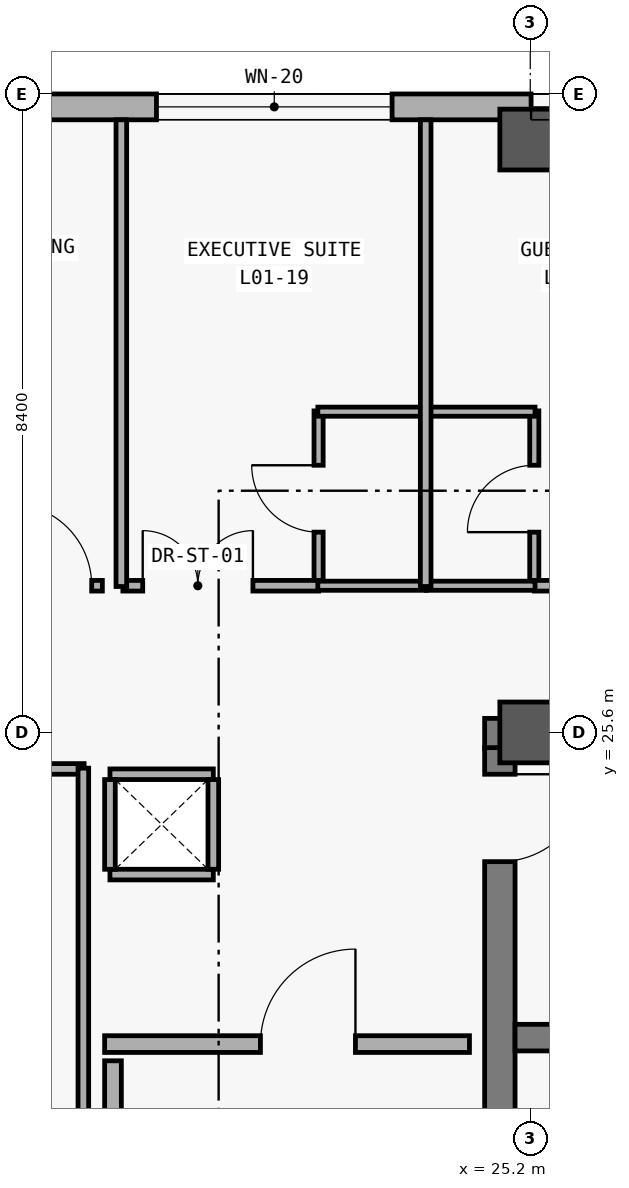
"""IFC4 building model, lengths in metres.
Left out: names, types, materials, properties, quantities, classifications, styles, units other than length and angle.
Written with IfcOpenShell. Run it as: python <this file> out.ifc"""

import sys

from ifc_helpers import new_model, si_unit, direction, frame, frame_2d, origin, origin_2d, place, context, subcontext, project, spatial, rectangle, extrude, element, fill, save


model = new_model("IFC4")
c1 = context("Model", 3, precision=1e-05, world=origin(), true_north=direction((0.0, 1.0)))
c2 = subcontext(c1, "Body", "Model", "MODEL_VIEW")
j1 = project(units=[si_unit("LENGTHUNIT", "METRE"), si_unit("PLANEANGLEUNIT", "RADIAN")], contexts=[c1])
p1 = place(None, origin())
s1 = spatial("IfcSite", under=j1, at=p1, CompositionType="ELEMENT")
p2 = place(p1, origin())
s2 = spatial("IfcBuilding", under=s1, at=p2, CompositionType="ELEMENT")
p3 = place(p2, frame((0.0, 0.0, 5.4)))
s3 = spatial("IfcBuildingStorey", under=s2, at=p3, CompositionType="ELEMENT", Elevation=5.4)
for number, where, z_axis, x_axis in (
    (1, (25.2, 25.6, 0.0), (0.0, 0.0, 1.0), (1.0, 0.0, 0.0)),
    (2, (25.2, 33.4, 0.0), (0.0, 0.0, 1.0), (1.0, 0.0, 0.0)),
):
    element("IfcColumn", number, at=place(p3, frame(where, z_axis=z_axis, x_axis=x_axis)), inside=s3, PredefinedType="COLUMN", context=c2, shape_type="SweptSolid", body=[
        extrude(rectangle(XDim=0.8, YDim=0.8, at=origin_2d()), origin(), (0.0, 0.0, 1.0), 5.4),
    ])
p4 = place(p3, frame((8.74, 33.83, 0.0), z_axis=(0.0, 0.0, 1.0), x_axis=(1.0, 0.0, 0.0)))
e3 = element("IfcWall", 3, at=p4, inside=s3, PredefinedType="SOLIDWALL", context=c2, shape_type="SweptSolid", body=[
    extrude(rectangle(XDim=83.32, YDim=0.34, at=frame_2d((41.66, 0.0))), origin(), (0.0, 0.0, 1.0), 5.1),
])
p5 = place(p4, frame((4.795, 0.0, 0.85)))
e4 = element("IfcOpeningElement", 4, at=p5, cuts=e3, PredefinedType="OPENING", context=c2, shape_type="SweptSolid", body=[
    extrude(rectangle(XDim=1.58, YDim=1.85, at=frame_2d((0.79, 0.925))), frame((0.0, 0.18, 0.0), z_axis=(0.0, -1.0, 0.0), x_axis=(1.0, 0.0, 0.0)), (0.0, 0.0, 1.0), 0.36),
])
p6 = place(p4, frame((11.542, 0.0, 0.85)))
e5 = element("IfcOpeningElement", 5, at=p6, cuts=e3, PredefinedType="OPENING", context=c2, shape_type="SweptSolid", body=[
    extrude(rectangle(XDim=3.1, YDim=2.2, at=frame_2d((1.55, 1.1))), frame((0.0, 0.18, 0.0), z_axis=(0.0, -1.0, 0.0), x_axis=(1.0, 0.0, 0.0)), (0.0, 0.0, 1.0), 0.36),
])
p7 = place(p4, frame((16.471, 0.0, 0.85)))
e6 = element("IfcOpeningElement", 6, at=p7, cuts=e3, PredefinedType="OPENING", context=c2, shape_type="SweptSolid", body=[
    extrude(rectangle(XDim=1.25, YDim=1.45, at=frame_2d((0.625, 0.725))), frame((0.0, 0.18, 0.0), z_axis=(0.0, -1.0, 0.0), x_axis=(1.0, 0.0, 0.0)), (0.0, 0.0, 1.0), 0.36),
])
p8 = place(p4, frame((20.425, 0.0, 0.85)))
e7 = element("IfcOpeningElement", 7, at=p8, cuts=e3, PredefinedType="OPENING", context=c2, shape_type="SweptSolid", body=[
    extrude(rectangle(XDim=1.35, YDim=1.55, at=frame_2d((0.675, 0.775))), frame((0.0, 0.18, 0.0), z_axis=(0.0, -1.0, 0.0), x_axis=(1.0, 0.0, 0.0)), (0.0, 0.0, 1.0), 0.36),
])
p9 = place(p4, frame((24.379, 0.0, 0.85)))
e8 = element("IfcOpeningElement", 8, at=p9, cuts=e3, PredefinedType="OPENING", context=c2, shape_type="SweptSolid", body=[
    extrude(rectangle(XDim=1.45, YDim=1.65, at=frame_2d((0.725, 0.825))), frame((0.0, 0.18, 0.0), z_axis=(0.0, -1.0, 0.0), x_axis=(1.0, 0.0, 0.0)), (0.0, 0.0, 1.0), 0.36),
])
p10 = place(p4, frame((28.332, 0.0, 0.85)))
e9 = element("IfcOpeningElement", 9, at=p10, cuts=e3, PredefinedType="OPENING", context=c2, shape_type="SweptSolid", body=[
    extrude(rectangle(XDim=1.55, YDim=1.65, at=frame_2d((0.775, 0.825))), frame((0.0, 0.18, 0.0), z_axis=(0.0, -1.0, 0.0), x_axis=(1.0, 0.0, 0.0)), (0.0, 0.0, 1.0), 0.36),
])
p11 = place(p4, frame((32.261, 0.0, 0.85)))
e10 = element("IfcOpeningElement", 10, at=p11, cuts=e3, PredefinedType="OPENING", context=c2, shape_type="SweptSolid", body=[
    extrude(rectangle(XDim=1.7, YDim=2.0, at=frame_2d((0.85, 1.0))), frame((0.0, 0.18, 0.0), z_axis=(0.0, -1.0, 0.0), x_axis=(1.0, 0.0, 0.0)), (0.0, 0.0, 1.0), 0.36),
])
p12 = place(p4, frame((35.965, 0.0, 0.85)))
e11 = element("IfcOpeningElement", 11, at=p12, cuts=e3, PredefinedType="OPENING", context=c2, shape_type="SweptSolid", body=[
    extrude(rectangle(XDim=2.3, YDim=2.05, at=frame_2d((1.15, 1.025))), frame((0.0, 0.18, 0.0), z_axis=(0.0, -1.0, 0.0), x_axis=(1.0, 0.0, 0.0)), (0.0, 0.0, 1.0), 0.36),
])
p13 = place(p4, frame((39.744, 0.0, 0.85)))
e12 = element("IfcOpeningElement", 12, at=p13, cuts=e3, PredefinedType="OPENING", context=c2, shape_type="SweptSolid", body=[
    extrude(rectangle(XDim=2.75, YDim=2.1, at=frame_2d((1.375, 1.05))), frame((0.0, 0.18, 0.0), z_axis=(0.0, -1.0, 0.0), x_axis=(1.0, 0.0, 0.0)), (0.0, 0.0, 1.0), 0.36),
])
p14 = place(p4, frame((44.533, 0.0, 0.85)))
e13 = element("IfcOpeningElement", 13, at=p14, cuts=e3, PredefinedType="OPENING", context=c2, shape_type="SweptSolid", body=[
    extrude(rectangle(XDim=1.18, YDim=1.5, at=frame_2d((0.59, 0.75))), frame((0.0, 0.18, 0.0), z_axis=(0.0, -1.0, 0.0), x_axis=(1.0, 0.0, 0.0)), (0.0, 0.0, 1.0), 0.36),
])
p15 = place(p4, frame((48.487, 0.0, 0.85)))
e14 = element("IfcOpeningElement", 14, at=p15, cuts=e3, PredefinedType="OPENING", context=c2, shape_type="SweptSolid", body=[
    extrude(rectangle(XDim=1.28, YDim=1.6, at=frame_2d((0.64, 0.8))), frame((0.0, 0.18, 0.0), z_axis=(0.0, -1.0, 0.0), x_axis=(1.0, 0.0, 0.0)), (0.0, 0.0, 1.0), 0.36),
])
p16 = place(p4, frame((52.441, 0.0, 0.85)))
e15 = element("IfcOpeningElement", 15, at=p16, cuts=e3, PredefinedType="OPENING", context=c2, shape_type="SweptSolid", body=[
    extrude(rectangle(XDim=1.38, YDim=1.7, at=frame_2d((0.69, 0.85))), frame((0.0, 0.18, 0.0), z_axis=(0.0, -1.0, 0.0), x_axis=(1.0, 0.0, 0.0)), (0.0, 0.0, 1.0), 0.36),
])
p17 = place(p4, frame((56.395, 0.0, 0.85)))
e16 = element("IfcOpeningElement", 16, at=p17, cuts=e3, PredefinedType="OPENING", context=c2, shape_type="SweptSolid", body=[
    extrude(rectangle(XDim=1.48, YDim=1.8, at=frame_2d((0.74, 0.9))), frame((0.0, 0.18, 0.0), z_axis=(0.0, -1.0, 0.0), x_axis=(1.0, 0.0, 0.0)), (0.0, 0.0, 1.0), 0.36),
])
p18 = place(p4, frame((60.349, 0.0, 0.85)))
e17 = element("IfcOpeningElement", 17, at=p18, cuts=e3, PredefinedType="OPENING", context=c2, shape_type="SweptSolid", body=[
    extrude(rectangle(XDim=1.58, YDim=1.85, at=frame_2d((0.79, 0.925))), frame((0.0, 0.18, 0.0), z_axis=(0.0, -1.0, 0.0), x_axis=(1.0, 0.0, 0.0)), (0.0, 0.0, 1.0), 0.36),
])
p19 = place(p4, frame((64.302, 0.0, 0.85)))
e18 = element("IfcOpeningElement", 18, at=p19, cuts=e3, PredefinedType="OPENING", context=c2, shape_type="SweptSolid", body=[
    extrude(rectangle(XDim=1.68, YDim=1.9, at=frame_2d((0.84, 0.95))), frame((0.0, 0.18, 0.0), z_axis=(0.0, -1.0, 0.0), x_axis=(1.0, 0.0, 0.0)), (0.0, 0.0, 1.0), 0.36),
])
p20 = place(p4, frame((68.256, 0.0, 0.85)))
e19 = element("IfcOpeningElement", 19, at=p20, cuts=e3, PredefinedType="OPENING", context=c2, shape_type="SweptSolid", body=[
    extrude(rectangle(XDim=1.78, YDim=1.95, at=frame_2d((0.89, 0.975))), frame((0.0, 0.18, 0.0), z_axis=(0.0, -1.0, 0.0), x_axis=(1.0, 0.0, 0.0)), (0.0, 0.0, 1.0), 0.36),
])
p21 = place(p4, frame((72.21, 0.0, 0.85)))
e20 = element("IfcOpeningElement", 20, at=p21, cuts=e3, PredefinedType="OPENING", context=c2, shape_type="SweptSolid", body=[
    extrude(rectangle(XDim=1.88, YDim=1.95, at=frame_2d((0.94, 0.975))), frame((0.0, 0.18, 0.0), z_axis=(0.0, -1.0, 0.0), x_axis=(1.0, 0.0, 0.0)), (0.0, 0.0, 1.0), 0.36),
])
p22 = place(p4, frame((76.129, 0.0, 0.85)))
e21 = element("IfcOpeningElement", 21, at=p22, cuts=e3, PredefinedType="OPENING", context=c2, shape_type="SweptSolid", body=[
    extrude(rectangle(XDim=2.05, YDim=1.95, at=frame_2d((1.025, 0.975))), frame((0.0, 0.18, 0.0), z_axis=(0.0, -1.0, 0.0), x_axis=(1.0, 0.0, 0.0)), (0.0, 0.0, 1.0), 0.36),
])
p23 = place(p4, frame((80.068, 0.0, 0.85)))
e22 = element("IfcOpeningElement", 22, at=p23, cuts=e3, PredefinedType="OPENING", context=c2, shape_type="SweptSolid", body=[
    extrude(rectangle(XDim=2.18, YDim=1.95, at=frame_2d((1.09, 0.975))), frame((0.0, 0.18, 0.0), z_axis=(0.0, -1.0, 0.0), x_axis=(1.0, 0.0, 0.0)), (0.0, 0.0, 1.0), 0.36),
])
p24 = place(p3, frame((33.8, 25.585, 0.0), z_axis=(0.0, 0.0, 1.0), x_axis=(-1.0, 0.0, 0.0)))
e23 = element("IfcWall", 23, at=p24, inside=s3, PredefinedType="SHEAR", context=c2, shape_type="SweptSolid", body=[
    extrude(rectangle(XDim=9.2, YDim=0.4, at=frame_2d((4.6, 0.0))), origin(), (0.0, 0.0, 1.0), 5.08),
])
p25 = place(p3, frame((24.8, 25.4, 0.0), z_axis=(0.0, 0.0, 1.0), x_axis=(0.0, -1.0, 0.0)))
e24 = element("IfcWall", 24, at=p25, inside=s3, PredefinedType="SHEAR", context=c2, shape_type="SweptSolid", body=[
    extrude(rectangle(XDim=7.4, YDim=0.4, at=frame_2d((3.7, 0.0))), origin(), (0.0, 0.0, 1.0), 5.08),
])
p26 = place(p25, frame((0.35, 0.0, 0.0)))
e25 = element("IfcOpeningElement", 25, at=p26, cuts=e24, PredefinedType="OPENING", context=c2, shape_type="SweptSolid", body=[
    extrude(rectangle(XDim=1.15, YDim=2.2, at=frame_2d((0.575, 1.1))), frame((0.0, 0.21, 0.0), z_axis=(0.0, -1.0, 0.0), x_axis=(1.0, 0.0, 0.0)), (0.0, 0.0, 1.0), 0.42),
])
p27 = place(p3, frame((25.0, 21.585, 0.0), z_axis=(0.0, 0.0, 1.0), x_axis=(1.0, 0.0, 0.0)))
e26 = element("IfcWall", 26, at=p27, inside=s3, PredefinedType="SHEAR", context=c2, shape_type="SweptSolid", body=[
    extrude(rectangle(XDim=8.4, YDim=0.35, at=frame_2d((4.2, 0.0))), origin(), (0.0, 0.0, 1.0), 5.08),
])
p28 = place(p3, frame((19.6, 21.5, 0.0), z_axis=(0.0, 0.0, 1.0), x_axis=(1.0, 0.0, 0.0)))
e27 = element("IfcWall", 27, at=p28, inside=s3, PredefinedType="SOLIDWALL", context=c2, shape_type="SweptSolid", body=[
    extrude(rectangle(XDim=4.8, YDim=0.22, at=frame_2d((2.4, 0.0))), origin(), (0.0, 0.0, 1.0), 4.23),
])
p29 = place(p28, frame((2.05, 0.0, 0.0)))
e28 = element("IfcOpeningElement", 28, at=p29, cuts=e27, PredefinedType="OPENING", context=c2, shape_type="SweptSolid", body=[
    extrude(rectangle(XDim=1.25, YDim=2.2, at=frame_2d((0.625, 1.1))), frame((0.0, 0.12, 0.0), z_axis=(0.0, -1.0, 0.0), x_axis=(1.0, 0.0, 0.0)), (0.0, 0.0, 1.0), 0.24),
])
p30 = place(p3, frame((19.71, 18.22, 0.0), z_axis=(0.0, 0.0, 1.0), x_axis=(0.0, 1.0, 0.0)))
e29 = element("IfcWall", 29, at=p30, inside=s3, PredefinedType="SOLIDWALL", context=c2, shape_type="SweptSolid", body=[
    extrude(rectangle(XDim=3.06, YDim=0.22, at=frame_2d((1.53, 0.0))), origin(), (0.0, 0.0, 1.0), 4.23),
])
p31 = place(p3, frame((22.415, 27.52, 0.0), z_axis=(0.0, 0.0, 1.0), x_axis=(0.0, 1.0, 0.0)))
e30 = element("IfcWall", 30, at=p31, inside=s3, PredefinedType="PARTITIONING", context=c2, shape_type="SweptSolid", body=[
    extrude(rectangle(XDim=2.31, YDim=0.12, at=frame_2d((1.155, 0.0))), origin(), (0.0, 0.0, 1.0), 4.18),
])
p32 = place(p31, frame((0.715, 0.0, 0.0)))
e31 = element("IfcOpeningElement", 31, at=p32, cuts=e30, PredefinedType="OPENING", context=c2, shape_type="SweptSolid", body=[
    extrude(rectangle(XDim=0.88, YDim=2.15, at=frame_2d((0.44, 1.075))), frame((0.0, 0.07, 0.0), z_axis=(0.0, -1.0, 0.0), x_axis=(1.0, 0.0, 0.0)), (0.0, 0.0, 1.0), 0.14),
])
p33 = place(p3, frame((25.253, 27.52, 0.0), z_axis=(0.0, 0.0, 1.0), x_axis=(0.0, 1.0, 0.0)))
e32 = element("IfcWall", 32, at=p33, inside=s3, PredefinedType="PARTITIONING", context=c2, shape_type="SweptSolid", body=[
    extrude(rectangle(XDim=2.31, YDim=0.12, at=frame_2d((1.155, 0.0))), origin(), (0.0, 0.0, 1.0), 4.18),
])
p34 = place(p33, frame((0.715, 0.0, 0.0)))
e33 = element("IfcOpeningElement", 33, at=p34, cuts=e32, PredefinedType="OPENING", context=c2, shape_type="SweptSolid", body=[
    extrude(rectangle(XDim=0.88, YDim=2.15, at=frame_2d((0.44, 1.075))), frame((0.0, 0.07, 0.0), z_axis=(0.0, -1.0, 0.0), x_axis=(1.0, 0.0, 0.0)), (0.0, 0.0, 1.0), 0.14),
])
p35 = place(p3, frame((16.96, 27.53, 0.0), z_axis=(0.0, 0.0, 1.0), x_axis=(1.0, 0.0, 0.0)))
e34 = element("IfcWall", 34, at=p35, inside=s3, PredefinedType="PARTITIONING", context=c2, shape_type="SweptSolid", body=[
    extrude(rectangle(XDim=2.61, YDim=0.14, at=frame_2d((1.305, 0.0))), origin(), (0.0, 0.0, 1.0), 4.18),
])
p36 = place(p35, frame((1.39, 0.0, 0.0)))
e35 = element("IfcOpeningElement", 35, at=p36, cuts=e34, PredefinedType="OPENING", context=c2, shape_type="SweptSolid", body=[
    extrude(rectangle(XDim=1.08, YDim=2.25, at=frame_2d((0.54, 1.125))), frame((0.0, 0.08, 0.0), z_axis=(0.0, -1.0, 0.0), x_axis=(1.0, 0.0, 0.0)), (0.0, 0.0, 1.0), 0.16),
])
p37 = place(p3, frame((19.84, 27.53, 0.0), z_axis=(0.0, 0.0, 1.0), x_axis=(1.0, 0.0, 0.0)))
e36 = element("IfcWall", 36, at=p37, inside=s3, PredefinedType="PARTITIONING", context=c2, shape_type="SweptSolid", body=[
    extrude(rectangle(XDim=2.575, YDim=0.14, at=frame_2d((1.288, 0.0))), origin(), (0.0, 0.0, 1.0), 4.18),
])
p38 = place(p37, frame((0.261, 0.0, 0.0)))
e37 = element("IfcOpeningElement", 37, at=p38, cuts=e36, PredefinedType="OPENING", context=c2, shape_type="SweptSolid", body=[
    extrude(rectangle(XDim=1.45, YDim=2.3, at=frame_2d((0.725, 1.15))), frame((0.0, 0.08, 0.0), z_axis=(0.0, -1.0, 0.0), x_axis=(1.0, 0.0, 0.0)), (0.0, 0.0, 1.0), 0.16),
])
p39 = place(p3, frame((25.253, 27.53, 0.0), z_axis=(0.0, 0.0, 1.0), x_axis=(1.0, 0.0, 0.0)))
e38 = element("IfcWall", 38, at=p39, inside=s3, PredefinedType="PARTITIONING", context=c2, shape_type="SweptSolid", body=[
    extrude(rectangle(XDim=2.575, YDim=0.14, at=frame_2d((1.288, 0.0))), origin(), (0.0, 0.0, 1.0), 4.18),
])
p40 = place(p39, frame((1.398, 0.0, 0.0)))
e39 = element("IfcOpeningElement", 39, at=p40, cuts=e38, PredefinedType="OPENING", context=c2, shape_type="SweptSolid", body=[
    extrude(rectangle(XDim=0.94, YDim=2.2, at=frame_2d((0.47, 1.1))), frame((0.0, 0.08, 0.0), z_axis=(0.0, -1.0, 0.0), x_axis=(1.0, 0.0, 0.0)), (0.0, 0.0, 1.0), 0.16),
])
for number, where, z_axis, x_axis in (
    (40, (22.405, 27.53, 0.0), (0.0, 0.0, 1.0), (1.0, 0.0, 0.0)),
    (41, (22.405, 29.82, 0.0), (0.0, 0.0, 1.0), (1.0, 0.0, 0.0)),
    (42, (23.834, 27.53, 0.0), (0.0, 0.0, 1.0), (1.0, 0.0, 0.0)),
    (43, (23.834, 29.82, 0.0), (0.0, 0.0, 1.0), (1.0, 0.0, 0.0)),
):
    element("IfcWall", number, at=place(p3, frame(where, z_axis=z_axis, x_axis=x_axis)), inside=s3, PredefinedType="PARTITIONING", context=c2, shape_type="SweptSolid", body=[
        extrude(rectangle(XDim=1.429, YDim=0.12, at=frame_2d((0.714, 0.0))), origin(), (0.0, 0.0, 1.0), 4.18),
    ])
p41 = place(p3, frame((8.74, 25.12, 0.0), z_axis=(0.0, 0.0, 1.0), x_axis=(1.0, 0.0, 0.0)))
e44 = element("IfcWall", 44, at=p41, inside=s3, PredefinedType="PARTITIONING", context=c2, shape_type="SweptSolid", body=[
    extrude(rectangle(XDim=10.59, YDim=0.14, at=frame_2d((5.295, 0.0))), origin(), (0.0, 0.0, 1.0), 4.18),
])
p42 = place(p3, frame((19.32, 17.77, 0.0), z_axis=(0.0, 0.0, 1.0), x_axis=(0.0, 1.0, 0.0)))
e45 = element("IfcWall", 45, at=p42, inside=s3, PredefinedType="PARTITIONING", context=c2, shape_type="SweptSolid", body=[
    extrude(rectangle(XDim=7.36, YDim=0.14, at=frame_2d((3.68, 0.0))), origin(), (0.0, 0.0, 1.0), 4.18),
])
for number, where, z_axis, x_axis in (
    (46, (19.82, 27.52, 0.0), (0.0, 0.0, 1.0), (0.0, 1.0, 0.0)),
    (47, (23.824, 27.52, 0.0), (0.0, 0.0, 1.0), (0.0, 1.0, 0.0)),
):
    element("IfcWall", number, at=place(p3, frame(where, z_axis=z_axis, x_axis=x_axis)), inside=s3, PredefinedType="PARTITIONING", context=c2, shape_type="SweptSolid", body=[
        extrude(rectangle(XDim=6.14, YDim=0.14, at=frame_2d((3.07, 0.0))), origin(), (0.0, 0.0, 1.0), 4.18),
    ])
for number, where, z_axis, x_axis in (
    (48, (19.67, 23.73, 0.0), (0.0, 0.0, 1.0), (1.0, 0.0, 0.0)),
    (49, (21.03, 25.05, 0.0), (0.0, 0.0, 1.0), (-1.0, 0.0, 0.0)),
):
    element("IfcWall", number, at=place(p3, frame(where, z_axis=z_axis, x_axis=x_axis)), inside=s3, PredefinedType="PARTITIONING", context=c2, shape_type="SweptSolid", body=[
        extrude(rectangle(XDim=1.36, YDim=0.14, at=frame_2d((0.68, 0.0))), origin(), (0.0, 0.0, 1.0), 4.2),
    ])
for number, where, z_axis, x_axis in (
    (50, (19.67, 24.98, 0.0), (0.0, 0.0, 1.0), (0.0, -1.0, 0.0)),
    (51, (21.03, 23.8, 0.0), (0.0, 0.0, 1.0), (0.0, 1.0, 0.0)),
):
    element("IfcWall", number, at=place(p3, frame(where, z_axis=z_axis, x_axis=x_axis)), inside=s3, PredefinedType="PARTITIONING", context=c2, shape_type="SweptSolid", body=[
        extrude(rectangle(XDim=1.18, YDim=0.14, at=frame_2d((0.59, 0.0))), origin(), (0.0, 0.0, 1.0), 4.2),
    ])
p43 = place(p6, origin())
e52 = element("IfcWindow", 52, at=p43, inside=s3, PartitioningType="SINGLE_PANEL", PredefinedType="WINDOW", context=c2, shape_type="SweptSolid", body=[
    extrude(rectangle(XDim=3.1, YDim=2.2, at=frame_2d((1.55, 1.1))), frame((0.0, 0.03, 0.0), z_axis=(0.0, -1.0, 0.0), x_axis=(1.0, 0.0, 0.0)), (0.0, 0.0, 1.0), 0.06),
])
fill(e5, e52)
p44 = place(p7, origin())
e53 = element("IfcWindow", 53, at=p44, inside=s3, PartitioningType="SINGLE_PANEL", PredefinedType="WINDOW", context=c2, shape_type="SweptSolid", body=[
    extrude(rectangle(XDim=1.25, YDim=1.45, at=frame_2d((0.625, 0.725))), frame((0.0, 0.03, 0.0), z_axis=(0.0, -1.0, 0.0), x_axis=(1.0, 0.0, 0.0)), (0.0, 0.0, 1.0), 0.06),
])
fill(e6, e53)
p45 = place(p26, origin())
e54 = element("IfcDoor", 54, at=p45, inside=s3, OperationType="SINGLE_SWING_LEFT", PredefinedType="DOOR", context=c2, shape_type="SweptSolid", body=[
    extrude(rectangle(XDim=1.15, YDim=2.2, at=frame_2d((0.575, 1.1))), frame((0.0, 0.025, 0.0), z_axis=(0.0, -1.0, 0.0), x_axis=(1.0, 0.0, 0.0)), (0.0, 0.0, 1.0), 0.05),
])
fill(e25, e54)
p46 = place(p29, origin())
e55 = element("IfcDoor", 55, at=p46, inside=s3, OperationType="SINGLE_SWING_RIGHT", PredefinedType="DOOR", context=c2, shape_type="SweptSolid", body=[
    extrude(rectangle(XDim=1.25, YDim=2.2, at=frame_2d((0.625, 1.1))), frame((0.0, 0.025, 0.0), z_axis=(0.0, -1.0, 0.0), x_axis=(1.0, 0.0, 0.0)), (0.0, 0.0, 1.0), 0.05),
])
fill(e28, e55)
p47 = place(p32, origin())
e56 = element("IfcDoor", 56, at=p47, inside=s3, OperationType="SINGLE_SWING_RIGHT", PredefinedType="DOOR", context=c2, shape_type="SweptSolid", body=[
    extrude(rectangle(XDim=0.88, YDim=2.15, at=frame_2d((0.44, 1.075))), frame((0.0, 0.025, 0.0), z_axis=(0.0, -1.0, 0.0), x_axis=(1.0, 0.0, 0.0)), (0.0, 0.0, 1.0), 0.05),
])
fill(e31, e56)
p48 = place(p34, origin())
e57 = element("IfcDoor", 57, at=p48, inside=s3, OperationType="SINGLE_SWING_LEFT", PredefinedType="DOOR", context=c2, shape_type="SweptSolid", body=[
    extrude(rectangle(XDim=0.88, YDim=2.15, at=frame_2d((0.44, 1.075))), frame((0.0, 0.025, 0.0), z_axis=(0.0, -1.0, 0.0), x_axis=(1.0, 0.0, 0.0)), (0.0, 0.0, 1.0), 0.05),
])
fill(e33, e57)
p49 = place(p36, origin())
e58 = element("IfcDoor", 58, at=p49, inside=s3, OperationType="SINGLE_SWING_LEFT", PredefinedType="DOOR", context=c2, shape_type="SweptSolid", body=[
    extrude(rectangle(XDim=1.08, YDim=2.25, at=frame_2d((0.54, 1.125))), frame((0.0, 0.025, 0.0), z_axis=(0.0, -1.0, 0.0), x_axis=(1.0, 0.0, 0.0)), (0.0, 0.0, 1.0), 0.05),
])
fill(e35, e58)
p50 = place(p38, origin())
e59 = element("IfcDoor", 59, at=p50, inside=s3, OperationType="DOUBLE_DOOR_SINGLE_SWING", PredefinedType="DOOR", context=c2, shape_type="SweptSolid", body=[
    extrude(rectangle(XDim=1.45, YDim=2.3, at=frame_2d((0.725, 1.15))), frame((0.0, 0.025, 0.0), z_axis=(0.0, -1.0, 0.0), x_axis=(1.0, 0.0, 0.0)), (0.0, 0.0, 1.0), 0.05),
])
fill(e37, e59)
save(model, sys.argv[1])
